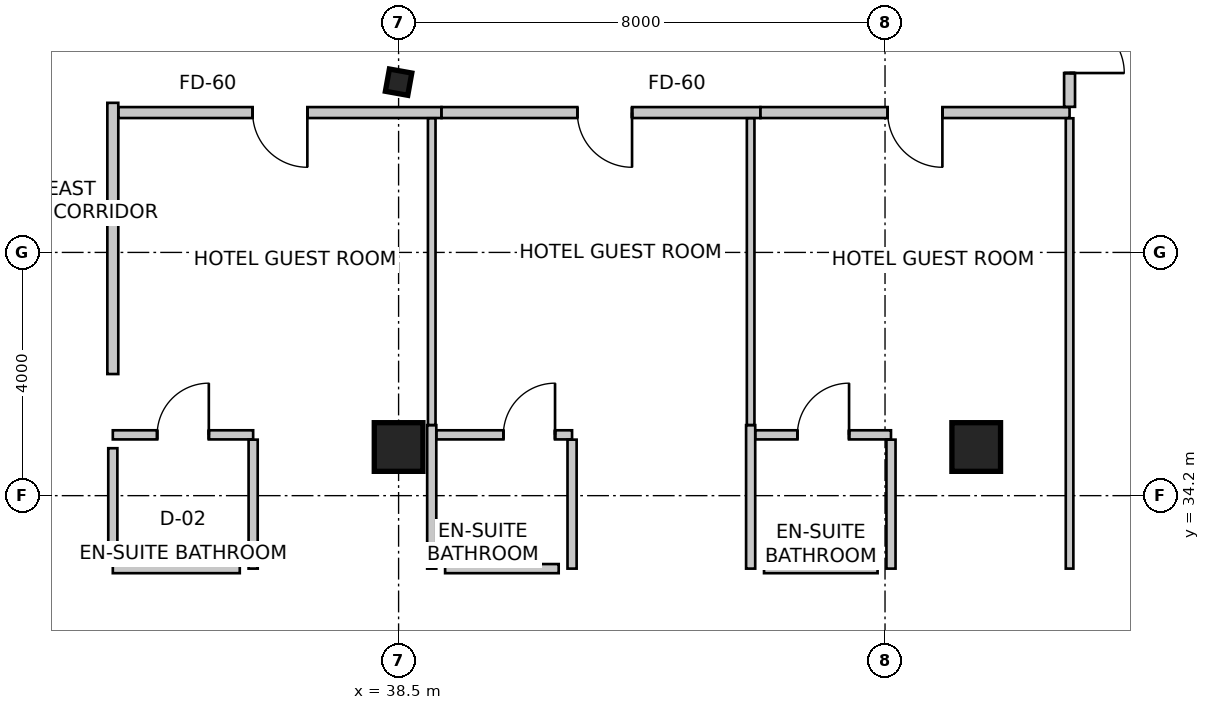
"""IFC4 building model, lengths in metres.
Left out: names, types, materials, properties, quantities, classifications, styles, units other than length and angle.
Written with IfcOpenShell. Run it as: python <this file> out.ifc"""

import sys

from ifc_helpers import new_model, si_unit, direction, frame, frame_2d, origin, origin_2d, place, context, subcontext, project, spatial, rectangle, i_section, extrude, source, transform, mapped, element, fill, save


model = new_model("IFC4")
c1 = context("Model", 3, precision=1e-05, world=origin(), true_north=direction((0.0, 1.0)))
c2 = subcontext(c1, "Body", "Model", "MODEL_VIEW")
j1 = project(units=[si_unit("LENGTHUNIT", "METRE"), si_unit("PLANEANGLEUNIT", "RADIAN")], contexts=[c1])
p1 = place(None, origin())
s1 = spatial("IfcSite", under=j1, at=p1, CompositionType="ELEMENT")
p2 = place(p1, origin())
s2 = spatial("IfcBuilding", under=s1, at=p2, CompositionType="ELEMENT")
p3 = place(p2, frame((0.0, 0.0, 128.6)))
s3 = spatial("IfcBuildingStorey", under=s2, at=p3, CompositionType="ELEMENT", Elevation=128.6)
m1 = source(origin(), c2, "Body", "SweptSolid", [
    extrude(rectangle(XDim=0.8, YDim=0.8, at=origin_2d()), origin(), (0.0, 0.0, 1.0), 3.6),
])
for number, where, z_axis, x_axis in (
    (1, (38.5, 35.0, 0.0), (0.0, 0.0, 1.0), (1.0, 0.0, 0.0)),
    (2, (48.0, 35.0, 0.0), (0.0, 0.0, 1.0), (1.0, 0.0, 0.0)),
):
    element("IfcColumn", number, at=place(p3, frame(where, z_axis=z_axis, x_axis=x_axis)), inside=s3, PredefinedType="COLUMN", context=c2, shape_type="MappedRepresentation", body=[
        mapped(m1, transform((0.0, 0.0, 0.0), scale=1.0)),
    ])
m2 = source(origin(), c2, "Body", "SweptSolid", [
    extrude(i_section(OverallWidth=0.374, OverallDepth=0.372, WebThickness=0.016, FlangeThickness=0.026, FilletRadius=0.015, at=origin_2d()), origin(), (0.0, 0.0, 1.0), 3.6),
])
p4 = place(p3, frame((38.5, 41.0, 0.0), z_axis=(0.0, 0.0, 1.0), x_axis=(0.984195607969, -0.17708474032, 0.0)))
e3 = element("IfcColumn", 3, at=p4, inside=s3, PredefinedType="COLUMN", context=c2, shape_type="MappedRepresentation", body=[
    mapped(m2, transform((0.0, 0.0, 0.0), scale=1.0)),
])
p5 = place(p3, frame((33.8, 40.66, 0.0), z_axis=(0.0, 0.0, 1.0), x_axis=(0.0, -1.0, 0.0)))
e4 = element("IfcWall", 4, at=p5, inside=s3, PredefinedType="PARTITIONING", context=c2, shape_type="SweptSolid", body=[
    extrude(rectangle(XDim=4.46, YDim=0.18, at=frame_2d((2.23, 0.0))), origin(), (0.0, 0.0, 1.0), 3.35),
])
p6 = place(p3, frame((39.205, 40.5, 0.0), z_axis=(0.0, 0.0, 1.0), x_axis=(-1.0, 0.0, 0.0)))
e5 = element("IfcWall", 5, at=p6, inside=s3, PredefinedType="PARTITIONING", context=c2, shape_type="SweptSolid", body=[
    extrude(rectangle(XDim=5.311, YDim=0.18, at=frame_2d((2.656, 0.0))), origin(), (0.0, 0.0, 1.0), 2.803),
])
m3 = source(origin(), c2, "Body", "SweptSolid", [
    extrude(rectangle(XDim=0.9, YDim=2.15, at=frame_2d((0.45, 1.075))), frame((0.0, 0.1, 0.0), z_axis=(0.0, -1.0, 0.0), x_axis=(1.0, 0.0, 0.0)), (0.0, 0.0, 1.0), 0.2),
])
p7 = place(p6, frame((2.206, 0.0, 0.0)))
e6 = element("IfcOpeningElement", 6, at=p7, cuts=e5, PredefinedType="OPENING", context=c2, shape_type="MappedRepresentation", body=[
    mapped(m3, transform((0.0, 0.0, 0.0), scale=1.0)),
])
p8 = place(p3, frame((44.45, 40.5, 0.0), z_axis=(0.0, 0.0, 1.0), x_axis=(-1.0, 0.0, 0.0)))
e7 = element("IfcWall", 7, at=p8, inside=s3, PredefinedType="PARTITIONING", context=c2, shape_type="SweptSolid", body=[
    extrude(rectangle(XDim=5.243, YDim=0.18, at=frame_2d((2.622, 0.0))), origin(), (0.0, 0.0, 1.0), 2.879),
])
p9 = place(p8, frame((2.111, 0.0, 0.0)))
e8 = element("IfcOpeningElement", 8, at=p9, cuts=e7, PredefinedType="OPENING", context=c2, shape_type="MappedRepresentation", body=[
    mapped(m3, transform((0.0, 0.0, 0.0), scale=1.0)),
])
p10 = place(p3, frame((49.535, 40.5, 0.0), z_axis=(0.0, 0.0, 1.0), x_axis=(-1.0, 0.0, 0.0)))
e9 = element("IfcWall", 9, at=p10, inside=s3, PredefinedType="PARTITIONING", context=c2, shape_type="SweptSolid", body=[
    extrude(rectangle(XDim=5.083, YDim=0.18, at=frame_2d((2.542, 0.0))), origin(), (0.0, 0.0, 1.0), 2.803),
])
p11 = place(p10, frame((2.092, 0.0, 0.0)))
e10 = element("IfcOpeningElement", 10, at=p11, cuts=e9, PredefinedType="OPENING", context=c2, shape_type="MappedRepresentation", body=[
    mapped(m3, transform((0.0, 0.0, 0.0), scale=1.0)),
])
p12 = place(p3, frame((49.535, 42.606, 0.0), z_axis=(0.0, 0.0, 1.0), x_axis=(0.0, -1.0, 0.0)))
e11 = element("IfcWall", 11, at=p12, inside=s3, PredefinedType="PARTITIONING", context=c2, shape_type="SweptSolid", body=[
    extrude(rectangle(XDim=2.012, YDim=0.18, at=frame_2d((1.006, 0.0))), origin(), (0.0, 0.0, 1.0), 3.35),
])
p13 = place(p12, frame((0.556, 0.0, 0.0)))
e12 = element("IfcOpeningElement", 12, at=p13, cuts=e11, PredefinedType="OPENING", context=c2, shape_type="MappedRepresentation", body=[
    mapped(m3, transform((0.0, 0.0, 0.0), scale=1.0)),
])
p14 = place(p3, frame((33.8, 35.2, 0.0), z_axis=(0.0, 0.0, 1.0), x_axis=(1.0, 0.0, 0.0)))
e13 = element("IfcWall", 13, at=p14, inside=s3, PredefinedType="PARTITIONING", context=c2, shape_type="SweptSolid", body=[
    extrude(rectangle(XDim=2.308, YDim=0.15, at=frame_2d((1.154, 0.0))), origin(), (0.0, 0.0, 1.0), 3.35),
])
m4 = source(origin(), c2, "Body", "SweptSolid", [
    extrude(rectangle(XDim=0.85, YDim=2.15, at=frame_2d((0.425, 1.075))), frame((0.0, 0.085, 0.0), z_axis=(0.0, -1.0, 0.0), x_axis=(1.0, 0.0, 0.0)), (0.0, 0.0, 1.0), 0.17),
])
p15 = place(p14, frame((0.729, 0.0, 0.0)))
e14 = element("IfcOpeningElement", 14, at=p15, cuts=e13, PredefinedType="OPENING", context=c2, shape_type="MappedRepresentation", body=[
    mapped(m4, transform((0.0, 0.0, 0.0), scale=1.0)),
])
p16 = place(p3, frame((36.108, 35.121, 0.0), z_axis=(0.0, 0.0, 1.0), x_axis=(0.0, -1.0, 0.0)))
e15 = element("IfcWall", 15, at=p16, inside=s3, PredefinedType="PARTITIONING", context=c2, shape_type="SweptSolid", body=[
    extrude(rectangle(XDim=2.121, YDim=0.15, at=frame_2d((1.061, 0.0))), origin(), (0.0, 0.0, 1.0), 3.35),
])
p17 = place(p3, frame((39.045, 35.36, 0.0), z_axis=(0.0, 0.0, 1.0), x_axis=(0.0, -1.0, 0.0)))
e16 = element("IfcWall", 16, at=p17, inside=s3, PredefinedType="PARTITIONING", context=c2, shape_type="SweptSolid", body=[
    extrude(rectangle(XDim=2.36, YDim=0.15, at=frame_2d((1.18, 0.0))), origin(), (0.0, 0.0, 1.0), 2.492),
])
p18 = place(p3, frame((39.045, 40.406, 0.0), z_axis=(0.0, 0.0, 1.0), x_axis=(0.0, -1.0, 0.0)))
e17 = element("IfcWall", 17, at=p18, inside=s3, PredefinedType="PARTITIONING", context=c2, shape_type="SweptSolid", body=[
    extrude(rectangle(XDim=5.044, YDim=0.125, at=frame_2d((2.522, 0.0))), origin(), (0.0, 0.0, 1.0), 2.879),
])
p19 = place(p3, frame((39.124, 35.2, 0.0), z_axis=(0.0, 0.0, 1.0), x_axis=(1.0, 0.0, 0.0)))
e18 = element("IfcWall", 18, at=p19, inside=s3, PredefinedType="PARTITIONING", context=c2, shape_type="SweptSolid", body=[
    extrude(rectangle(XDim=2.229, YDim=0.15, at=frame_2d((1.115, 0.0))), origin(), (0.0, 0.0, 1.0), 2.492),
])
p20 = place(p19, frame((1.099, 0.0, 0.0)))
e19 = element("IfcOpeningElement", 19, at=p20, cuts=e18, PredefinedType="OPENING", context=c2, shape_type="MappedRepresentation", body=[
    mapped(m4, transform((0.0, 0.0, 0.0), scale=1.0)),
])
p21 = place(p3, frame((41.353, 35.121, 0.0), z_axis=(0.0, 0.0, 1.0), x_axis=(0.0, -1.0, 0.0)))
e20 = element("IfcWall", 20, at=p21, inside=s3, PredefinedType="PARTITIONING", context=c2, shape_type="SweptSolid", body=[
    extrude(rectangle(XDim=2.121, YDim=0.15, at=frame_2d((1.061, 0.0))), origin(), (0.0, 0.0, 1.0), 2.492),
])
p22 = place(p3, frame((44.29, 35.36, 0.0), z_axis=(0.0, 0.0, 1.0), x_axis=(0.0, -1.0, 0.0)))
e21 = element("IfcWall", 21, at=p22, inside=s3, PredefinedType="PARTITIONING", context=c2, shape_type="SweptSolid", body=[
    extrude(rectangle(XDim=2.36, YDim=0.15, at=frame_2d((1.18, 0.0))), origin(), (0.0, 0.0, 1.0), 2.492),
])
p23 = place(p3, frame((44.29, 40.406, 0.0), z_axis=(0.0, 0.0, 1.0), x_axis=(0.0, -1.0, 0.0)))
e22 = element("IfcWall", 22, at=p23, inside=s3, PredefinedType="PARTITIONING", context=c2, shape_type="SweptSolid", body=[
    extrude(rectangle(XDim=5.044, YDim=0.125, at=frame_2d((2.522, 0.0))), origin(), (0.0, 0.0, 1.0), 2.879),
])
p24 = place(p3, frame((44.369, 35.2, 0.0), z_axis=(0.0, 0.0, 1.0), x_axis=(1.0, 0.0, 0.0)))
e23 = element("IfcWall", 23, at=p24, inside=s3, PredefinedType="PARTITIONING", context=c2, shape_type="SweptSolid", body=[
    extrude(rectangle(XDim=2.229, YDim=0.15, at=frame_2d((1.115, 0.0))), origin(), (0.0, 0.0, 1.0), 2.492),
])
p25 = place(p24, frame((0.689, 0.0, 0.0)))
e24 = element("IfcOpeningElement", 24, at=p25, cuts=e23, PredefinedType="OPENING", context=c2, shape_type="MappedRepresentation", body=[
    mapped(m4, transform((0.0, 0.0, 0.0), scale=1.0)),
])
p26 = place(p3, frame((46.598, 35.121, 0.0), z_axis=(0.0, 0.0, 1.0), x_axis=(0.0, -1.0, 0.0)))
e25 = element("IfcWall", 25, at=p26, inside=s3, PredefinedType="PARTITIONING", context=c2, shape_type="SweptSolid", body=[
    extrude(rectangle(XDim=2.121, YDim=0.15, at=frame_2d((1.061, 0.0))), origin(), (0.0, 0.0, 1.0), 2.492),
])
p27 = place(p3, frame((49.535, 40.406, 0.0), z_axis=(0.0, 0.0, 1.0), x_axis=(0.0, -1.0, 0.0)))
e26 = element("IfcWall", 26, at=p27, inside=s3, PredefinedType="PARTITIONING", context=c2, shape_type="SweptSolid", body=[
    extrude(rectangle(XDim=7.406, YDim=0.125, at=frame_2d((3.703, 0.0))), origin(), (0.0, 0.0, 1.0), 3.35),
])
p28 = place(p3, frame((35.888, 33.0, 0.0), z_axis=(0.0, 0.0, 1.0), x_axis=(-1.0, 0.0, 0.0)))
e27 = element("IfcWall", 27, at=p28, inside=s3, PredefinedType="PARTITIONING", context=c2, shape_type="SweptSolid", body=[
    extrude(rectangle(XDim=2.088, YDim=0.15, at=frame_2d((1.044, 0.0))), origin(), (0.0, 0.0, 1.0), 3.35),
])
p29 = place(p3, frame((33.8, 33.22, 0.0), z_axis=(0.0, 0.0, 1.0), x_axis=(0.0, 1.0, 0.0)))
e28 = element("IfcWall", 28, at=p29, inside=s3, PredefinedType="PARTITIONING", context=c2, shape_type="SweptSolid", body=[
    extrude(rectangle(XDim=1.76, YDim=0.15, at=frame_2d((0.88, 0.0))), origin(), (0.0, 0.0, 1.0), 3.35),
])
p30 = place(p3, frame((41.133, 33.0, 0.0), z_axis=(0.0, 0.0, 1.0), x_axis=(-1.0, 0.0, 0.0)))
e29 = element("IfcWall", 29, at=p30, inside=s3, PredefinedType="PARTITIONING", context=c2, shape_type="SweptSolid", body=[
    extrude(rectangle(XDim=1.868, YDim=0.15, at=frame_2d((0.934, 0.0))), origin(), (0.0, 0.0, 1.0), 3.35),
])
p31 = place(p3, frame((46.378, 33.0, 0.0), z_axis=(0.0, 0.0, 1.0), x_axis=(-1.0, 0.0, 0.0)))
e30 = element("IfcWall", 30, at=p31, inside=s3, PredefinedType="PARTITIONING", context=c2, shape_type="SweptSolid", body=[
    extrude(rectangle(XDim=1.868, YDim=0.15, at=frame_2d((0.934, 0.0))), origin(), (0.0, 0.0, 1.0), 3.35),
])
m5 = source(origin(), c2, "Body", "SweptSolid", [
    extrude(rectangle(XDim=0.85, YDim=2.15, at=frame_2d((0.425, 1.075))), frame((0.0, 0.025, 0.0), z_axis=(0.0, -1.0, 0.0), x_axis=(1.0, 0.0, 0.0)), (0.0, 0.0, 1.0), 0.05),
])
p32 = place(p15, origin())
e31 = element("IfcDoor", 31, at=p32, inside=s3, OperationType="SINGLE_SWING_RIGHT", PredefinedType="DOOR", context=c2, shape_type="MappedRepresentation", body=[
    mapped(m5, transform((0.0, 0.0, 0.0), scale=1.0)),
])
fill(e14, e31)
m6 = source(origin(), c2, "Body", "SweptSolid", [
    extrude(rectangle(XDim=0.9, YDim=2.15, at=frame_2d((0.45, 1.075))), frame((0.0, 0.025, 0.0), z_axis=(0.0, -1.0, 0.0), x_axis=(1.0, 0.0, 0.0)), (0.0, 0.0, 1.0), 0.05),
])
p33 = place(p7, origin())
e32 = element("IfcDoor", 32, at=p33, inside=s3, OperationType="SINGLE_SWING_LEFT", PredefinedType="DOOR", context=c2, shape_type="MappedRepresentation", body=[
    mapped(m6, transform((0.0, 0.0, 0.0), scale=1.0)),
])
fill(e6, e32)
p34 = place(p20, origin())
e33 = element("IfcDoor", 33, at=p34, inside=s3, OperationType="SINGLE_SWING_RIGHT", PredefinedType="DOOR", context=c2, shape_type="MappedRepresentation", body=[
    mapped(m5, transform((0.0, 0.0, 0.0), scale=1.0)),
])
fill(e19, e33)
p35 = place(p9, origin())
e34 = element("IfcDoor", 34, at=p35, inside=s3, OperationType="SINGLE_SWING_LEFT", PredefinedType="DOOR", context=c2, shape_type="MappedRepresentation", body=[
    mapped(m6, transform((0.0, 0.0, 0.0), scale=1.0)),
])
fill(e8, e34)
p36 = place(p25, origin())
e35 = element("IfcDoor", 35, at=p36, inside=s3, OperationType="SINGLE_SWING_RIGHT", PredefinedType="DOOR", context=c2, shape_type="MappedRepresentation", body=[
    mapped(m5, transform((0.0, 0.0, 0.0), scale=1.0)),
])
fill(e24, e35)
p37 = place(p11, origin())
e36 = element("IfcDoor", 36, at=p37, inside=s3, OperationType="SINGLE_SWING_LEFT", PredefinedType="DOOR", context=c2, shape_type="MappedRepresentation", body=[
    mapped(m6, transform((0.0, 0.0, 0.0), scale=1.0)),
])
fill(e10, e36)
p38 = place(p13, origin())
e37 = element("IfcDoor", 37, at=p38, inside=s3, OperationType="SINGLE_SWING_RIGHT", PredefinedType="DOOR", context=c2, shape_type="MappedRepresentation", body=[
    mapped(m6, transform((0.0, 0.0, 0.0), scale=1.0)),
])
fill(e12, e37)
save(model, sys.argv[1])
